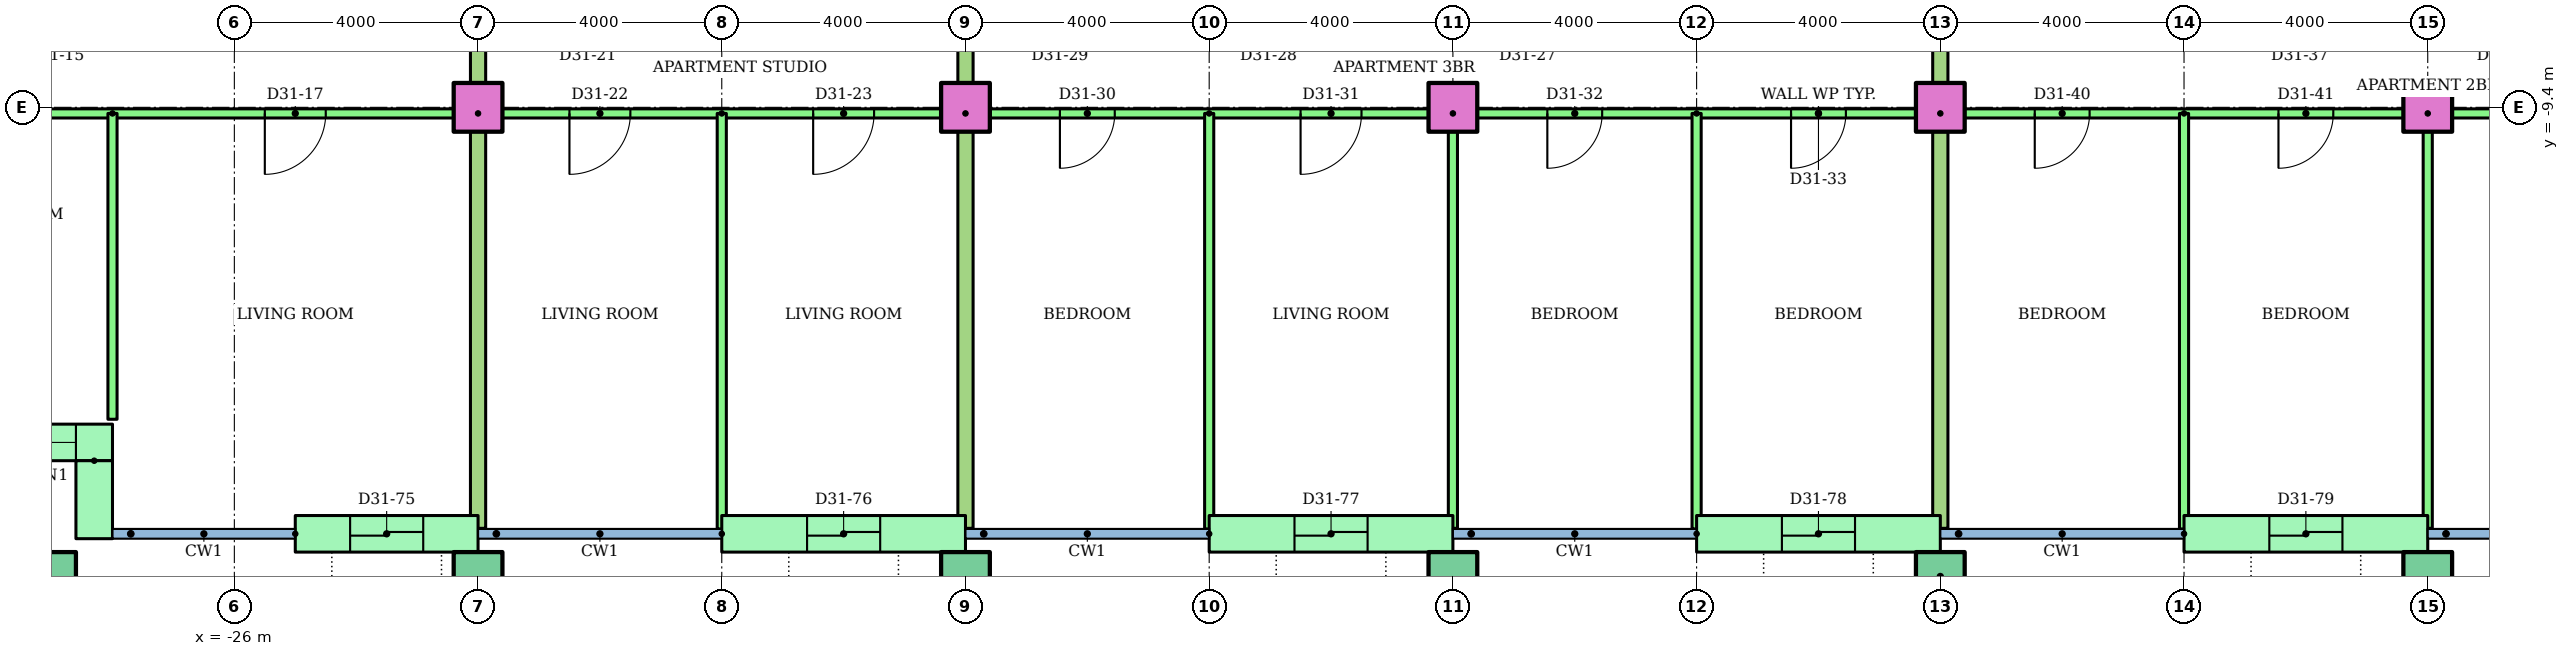
"""IFC4 building model, lengths in metres.
Left out: names, types, materials, properties, quantities, classifications, styles, units other than length and angle.
Written with IfcOpenShell. Run it as: python <this file> out.ifc"""

import sys

from ifc_helpers import new_model, si_unit, direction, frame, frame_2d, origin, origin_2d, place, context, subcontext, project, spatial, rectangle, hollow_rectangle, extrude, element, fill, save


model = new_model("IFC4")
c1 = context("Model", 3, precision=1e-05, world=origin(), true_north=direction((0.0, 1.0)))
c2 = subcontext(c1, "Body", "Model", "MODEL_VIEW")
j1 = project(units=[si_unit("LENGTHUNIT", "METRE"), si_unit("PLANEANGLEUNIT", "RADIAN")], contexts=[c1])
p1 = place(None, origin())
s1 = spatial("IfcSite", under=j1, at=p1, CompositionType="ELEMENT")
p2 = place(p1, origin())
s2 = spatial("IfcBuilding", under=s1, at=p2, CompositionType="ELEMENT")
p3 = place(p2, frame((0.0, 0.0, 123.0)))
s3 = spatial("IfcBuildingStorey", under=s2, at=p3, CompositionType="ELEMENT", Elevation=123.0)
for number, where in (
    (1, (-29.0, -17.1, 0.0)),
    (2, (-22.0, -17.1, 0.0)),
    (3, (-14.0, -17.1, 0.0)),
    (4, (-6.0, -17.1, 0.0)),
    (5, (2.0, -17.1, 0.0)),
    (6, (10.0, -17.1, 0.0)),
):
    element("IfcColumn", number, at=place(p3, frame(where)), inside=s3, PredefinedType="COLUMN", context=c2, shape_type="SweptSolid", body=[
        extrude(hollow_rectangle(XDim=0.8, YDim=0.8, WallThickness=0.04, at=origin_2d()), origin(), (0.0, 0.0, 1.0), 3.2),
    ])
for number, where in (
    (7, (-22.0, -9.4, 0.0)),
    (8, (-14.0, -9.4, 0.0)),
    (9, (-6.0, -9.4, 0.0)),
    (10, (2.0, -9.4, 0.0)),
    (11, (10.0, -9.4, 0.0)),
):
    element("IfcColumn", number, at=place(p3, frame(where)), inside=s3, PredefinedType="COLUMN", context=c2, shape_type="SweptSolid", body=[
        extrude(rectangle(XDim=0.8, YDim=0.8, at=origin_2d()), origin(), (0.0, 0.0, 1.0), 3.2),
    ])
p4 = place(p3, frame((-30.1, -14.9, 0.0)))
e12 = element("IfcWall", 12, at=p4, inside=s3, PredefinedType="STANDARD", context=c2, shape_type="SweptSolid", body=[
    extrude(rectangle(XDim=2.1, YDim=0.6, at=frame_2d((1.05, 0.0))), origin(), (0.0, 0.0, 1.0), 2.92),
])
p5 = place(p4, frame((0.6, 0.0, 0.9)))
e13 = element("IfcOpeningElement", 13, at=p5, cuts=e12, PredefinedType="OPENING", context=c2, shape_type="SweptSolid", body=[
    extrude(rectangle(XDim=0.9, YDim=1.5, at=frame_2d((0.45, 0.75))), frame((0.0, 0.31, 0.0), z_axis=(0.0, -1.0, 0.0), x_axis=(1.0, 0.0, 0.0)), (0.0, 0.0, 1.0), 0.62),
])
p6 = place(p3, frame((-28.3, -15.2, 0.0), z_axis=(0.0, 0.0, 1.0), x_axis=(0.0, -1.0, 0.0)))
e14 = element("IfcWall", 14, at=p6, inside=s3, PredefinedType="STANDARD", context=c2, shape_type="SweptSolid", body=[
    extrude(rectangle(XDim=1.28, YDim=0.6, at=frame_2d((0.64, 0.0))), origin(), (0.0, 0.0, 1.0), 2.92),
])
p7 = place(p3, frame((-25.0, -16.4, 0.0)))
e15 = element("IfcWall", 15, at=p7, inside=s3, PredefinedType="STANDARD", context=c2, shape_type="SweptSolid", body=[
    extrude(rectangle(XDim=3.0, YDim=0.6, at=frame_2d((1.5, 0.0))), origin(), (0.0, 0.0, 1.0), 2.92),
])
p8 = place(p7, frame((0.9, 0.0, 0.0)))
e16 = element("IfcOpeningElement", 16, at=p8, cuts=e15, PredefinedType="OPENING", context=c2, shape_type="SweptSolid", body=[
    extrude(rectangle(XDim=1.2, YDim=2.1, at=frame_2d((0.6, 1.05))), frame((0.0, 0.31, 0.0), z_axis=(0.0, -1.0, 0.0), x_axis=(1.0, 0.0, 0.0)), (0.0, 0.0, 1.0), 0.62),
])
p9 = place(p3, frame((-18.0, -16.4, 0.0)))
e17 = element("IfcWall", 17, at=p9, inside=s3, PredefinedType="STANDARD", context=c2, shape_type="SweptSolid", body=[
    extrude(rectangle(XDim=4.0, YDim=0.6, at=frame_2d((2.0, 0.0))), origin(), (0.0, 0.0, 1.0), 2.92),
])
p10 = place(p9, frame((1.4, 0.0, 0.0)))
e18 = element("IfcOpeningElement", 18, at=p10, cuts=e17, PredefinedType="OPENING", context=c2, shape_type="SweptSolid", body=[
    extrude(rectangle(XDim=1.2, YDim=2.1, at=frame_2d((0.6, 1.05))), frame((0.0, 0.31, 0.0), z_axis=(0.0, -1.0, 0.0), x_axis=(1.0, 0.0, 0.0)), (0.0, 0.0, 1.0), 0.62),
])
p11 = place(p3, frame((-10.0, -16.4, 0.0)))
e19 = element("IfcWall", 19, at=p11, inside=s3, PredefinedType="STANDARD", context=c2, shape_type="SweptSolid", body=[
    extrude(rectangle(XDim=4.0, YDim=0.6, at=frame_2d((2.0, 0.0))), origin(), (0.0, 0.0, 1.0), 2.92),
])
p12 = place(p11, frame((1.4, 0.0, 0.0)))
e20 = element("IfcOpeningElement", 20, at=p12, cuts=e19, PredefinedType="OPENING", context=c2, shape_type="SweptSolid", body=[
    extrude(rectangle(XDim=1.2, YDim=2.1, at=frame_2d((0.6, 1.05))), frame((0.0, 0.31, 0.0), z_axis=(0.0, -1.0, 0.0), x_axis=(1.0, 0.0, 0.0)), (0.0, 0.0, 1.0), 0.62),
])
p13 = place(p3, frame((-2.0, -16.4, 0.0)))
e21 = element("IfcWall", 21, at=p13, inside=s3, PredefinedType="STANDARD", context=c2, shape_type="SweptSolid", body=[
    extrude(rectangle(XDim=4.0, YDim=0.6, at=frame_2d((2.0, 0.0))), origin(), (0.0, 0.0, 1.0), 2.92),
])
p14 = place(p13, frame((1.4, 0.0, 0.0)))
e22 = element("IfcOpeningElement", 22, at=p14, cuts=e21, PredefinedType="OPENING", context=c2, shape_type="SweptSolid", body=[
    extrude(rectangle(XDim=1.2, YDim=2.1, at=frame_2d((0.6, 1.05))), frame((0.0, 0.31, 0.0), z_axis=(0.0, -1.0, 0.0), x_axis=(1.0, 0.0, 0.0)), (0.0, 0.0, 1.0), 0.62),
])
p15 = place(p3, frame((6.0, -16.4, 0.0)))
e23 = element("IfcWall", 23, at=p15, inside=s3, PredefinedType="STANDARD", context=c2, shape_type="SweptSolid", body=[
    extrude(rectangle(XDim=4.0, YDim=0.6, at=frame_2d((2.0, 0.0))), origin(), (0.0, 0.0, 1.0), 2.92),
])
p16 = place(p15, frame((1.4, 0.0, 0.0)))
e24 = element("IfcOpeningElement", 24, at=p16, cuts=e23, PredefinedType="OPENING", context=c2, shape_type="SweptSolid", body=[
    extrude(rectangle(XDim=1.2, YDim=2.1, at=frame_2d((0.6, 1.05))), frame((0.0, 0.31, 0.0), z_axis=(0.0, -1.0, 0.0), x_axis=(1.0, 0.0, 0.0)), (0.0, 0.0, 1.0), 0.62),
])
p17 = place(p3, frame((-22.0, -9.5, 0.0), z_axis=(0.0, 0.0, 1.0), x_axis=(-1.0, 0.0, 0.0)))
e25 = element("IfcWall", 25, at=p17, inside=s3, PredefinedType="PARTITIONING", context=c2, shape_type="SweptSolid", body=[
    extrude(rectangle(XDim=10.72, YDim=0.15, at=frame_2d((5.36, 0.0))), origin(), (0.0, 0.0, 1.0), 2.4),
])
p18 = place(p17, frame((8.618, 0.0, 0.0)))
e26 = element("IfcOpeningElement", 26, at=p18, cuts=e25, PredefinedType="OPENING", context=c2, shape_type="SweptSolid", body=[
    extrude(rectangle(XDim=0.9, YDim=2.1, at=frame_2d((0.45, 1.05))), frame((0.0, 0.085, 0.0), z_axis=(0.0, -1.0, 0.0), x_axis=(1.0, 0.0, 0.0)), (0.0, 0.0, 1.0), 0.17),
])
p19 = place(p17, frame((2.5, 0.0, 0.0)))
e27 = element("IfcOpeningElement", 27, at=p19, cuts=e25, PredefinedType="OPENING", context=c2, shape_type="SweptSolid", body=[
    extrude(rectangle(XDim=1.0, YDim=2.1, at=frame_2d((0.5, 1.05))), frame((0.0, 0.085, 0.0), z_axis=(0.0, -1.0, 0.0), x_axis=(1.0, 0.0, 0.0)), (0.0, 0.0, 1.0), 0.17),
])
p20 = place(p3, frame((-28.0, -9.5, 0.0), z_axis=(0.0, 0.0, 1.0), x_axis=(0.0, -1.0, 0.0)))
e28 = element("IfcWall", 28, at=p20, inside=s3, PredefinedType="PARTITIONING", context=c2, shape_type="SweptSolid", body=[
    extrude(rectangle(XDim=5.02, YDim=0.15, at=frame_2d((2.51, 0.0))), origin(), (0.0, 0.0, 1.0), 2.4),
])
p21 = place(p3, frame((-14.0, -9.5, 0.0), z_axis=(0.0, 0.0, 1.0), x_axis=(-1.0, 0.0, 0.0)))
e29 = element("IfcWall", 29, at=p21, inside=s3, PredefinedType="PARTITIONING", context=c2, shape_type="SweptSolid", body=[
    extrude(rectangle(XDim=8.0, YDim=0.15, at=frame_2d((4.0, 0.0))), origin(), (0.0, 0.0, 1.0), 2.4),
])
p22 = place(p21, frame((5.5, 0.0, 0.0)))
e30 = element("IfcOpeningElement", 30, at=p22, cuts=e29, PredefinedType="OPENING", context=c2, shape_type="SweptSolid", body=[
    extrude(rectangle(XDim=1.0, YDim=2.1, at=frame_2d((0.5, 1.05))), frame((0.0, 0.085, 0.0), z_axis=(0.0, -1.0, 0.0), x_axis=(1.0, 0.0, 0.0)), (0.0, 0.0, 1.0), 0.17),
])
p23 = place(p21, frame((1.5, 0.0, 0.0)))
e31 = element("IfcOpeningElement", 31, at=p23, cuts=e29, PredefinedType="OPENING", context=c2, shape_type="SweptSolid", body=[
    extrude(rectangle(XDim=1.0, YDim=2.1, at=frame_2d((0.5, 1.05))), frame((0.0, 0.085, 0.0), z_axis=(0.0, -1.0, 0.0), x_axis=(1.0, 0.0, 0.0)), (0.0, 0.0, 1.0), 0.17),
])
p24 = place(p3, frame((-18.0, -9.5, 0.0), z_axis=(0.0, 0.0, 1.0), x_axis=(0.0, -1.0, 0.0)))
e32 = element("IfcWall", 32, at=p24, inside=s3, PredefinedType="PARTITIONING", context=c2, shape_type="SweptSolid", body=[
    extrude(rectangle(XDim=6.821, YDim=0.15, at=frame_2d((3.411, 0.0))), origin(), (0.0, 0.0, 1.0), 2.4),
])
p25 = place(p3, frame((-22.0, -1.4, 0.0), z_axis=(0.0, 0.0, 1.0), x_axis=(0.0, -1.0, 0.0)))
e33 = element("IfcWall", 33, at=p25, inside=s3, PredefinedType="PARTITIONING", context=c2, shape_type="SweptSolid", body=[
    extrude(rectangle(XDim=14.91, YDim=0.25, at=frame_2d((7.455, 0.0))), origin(), (0.0, 0.0, 1.0), 2.4),
])
p26 = place(p3, frame((2.0, -9.5, 0.0), z_axis=(0.0, 0.0, 1.0), x_axis=(-1.0, 0.0, 0.0)))
e34 = element("IfcWall", 34, at=p26, inside=s3, PredefinedType="PARTITIONING", context=c2, shape_type="SweptSolid", body=[
    extrude(rectangle(XDim=16.0, YDim=0.15, at=frame_2d((8.0, 0.0))), origin(), (0.0, 0.0, 1.0), 2.4),
])
p27 = place(p26, frame((13.55, 0.0, 0.0)))
e35 = element("IfcOpeningElement", 35, at=p27, cuts=e34, PredefinedType="OPENING", context=c2, shape_type="SweptSolid", body=[
    extrude(rectangle(XDim=0.9, YDim=2.1, at=frame_2d((0.45, 1.05))), frame((0.0, 0.085, 0.0), z_axis=(0.0, -1.0, 0.0), x_axis=(1.0, 0.0, 0.0)), (0.0, 0.0, 1.0), 0.17),
])
p28 = place(p26, frame((9.5, 0.0, 0.0)))
e36 = element("IfcOpeningElement", 36, at=p28, cuts=e34, PredefinedType="OPENING", context=c2, shape_type="SweptSolid", body=[
    extrude(rectangle(XDim=1.0, YDim=2.1, at=frame_2d((0.5, 1.05))), frame((0.0, 0.085, 0.0), z_axis=(0.0, -1.0, 0.0), x_axis=(1.0, 0.0, 0.0)), (0.0, 0.0, 1.0), 0.17),
])
p29 = place(p26, frame((5.55, 0.0, 0.0)))
e37 = element("IfcOpeningElement", 37, at=p29, cuts=e34, PredefinedType="OPENING", context=c2, shape_type="SweptSolid", body=[
    extrude(rectangle(XDim=0.9, YDim=2.1, at=frame_2d((0.45, 1.05))), frame((0.0, 0.085, 0.0), z_axis=(0.0, -1.0, 0.0), x_axis=(1.0, 0.0, 0.0)), (0.0, 0.0, 1.0), 0.17),
])
p30 = place(p26, frame((1.55, 0.0, 0.0)))
e38 = element("IfcOpeningElement", 38, at=p30, cuts=e34, PredefinedType="OPENING", context=c2, shape_type="SweptSolid", body=[
    extrude(rectangle(XDim=0.9, YDim=2.1, at=frame_2d((0.45, 1.05))), frame((0.0, 0.085, 0.0), z_axis=(0.0, -1.0, 0.0), x_axis=(1.0, 0.0, 0.0)), (0.0, 0.0, 1.0), 0.17),
])
p31 = place(p3, frame((-10.0, -9.5, 0.0), z_axis=(0.0, 0.0, 1.0), x_axis=(0.0, -1.0, 0.0)))
e39 = element("IfcWall", 39, at=p31, inside=s3, PredefinedType="PARTITIONING", context=c2, shape_type="SweptSolid", body=[
    extrude(rectangle(XDim=6.821, YDim=0.15, at=frame_2d((3.411, 0.0))), origin(), (0.0, 0.0, 1.0), 2.4),
])
p32 = place(p3, frame((-6.0, -9.5, 0.0), z_axis=(0.0, 0.0, 1.0), x_axis=(0.0, -1.0, 0.0)))
e40 = element("IfcWall", 40, at=p32, inside=s3, PredefinedType="PARTITIONING", context=c2, shape_type="SweptSolid", body=[
    extrude(rectangle(XDim=6.81, YDim=0.15, at=frame_2d((3.405, 0.0))), origin(), (0.0, 0.0, 1.0), 2.4),
])
p33 = place(p3, frame((-2.0, -9.5, 0.0), z_axis=(0.0, 0.0, 1.0), x_axis=(0.0, -1.0, 0.0)))
e41 = element("IfcWall", 41, at=p33, inside=s3, PredefinedType="PARTITIONING", context=c2, shape_type="SweptSolid", body=[
    extrude(rectangle(XDim=6.821, YDim=0.15, at=frame_2d((3.411, 0.0))), origin(), (0.0, 0.0, 1.0), 2.4),
])
p34 = place(p3, frame((-14.0, -1.4, 0.0), z_axis=(0.0, 0.0, 1.0), x_axis=(0.0, -1.0, 0.0)))
e42 = element("IfcWall", 42, at=p34, inside=s3, PredefinedType="PARTITIONING", context=c2, shape_type="SweptSolid", body=[
    extrude(rectangle(XDim=14.91, YDim=0.25, at=frame_2d((7.455, 0.0))), origin(), (0.0, 0.0, 1.0), 2.4),
])
p35 = place(p3, frame((18.0, -9.5, 0.0), z_axis=(0.0, 0.0, 1.0), x_axis=(-1.0, 0.0, 0.0)))
e43 = element("IfcWall", 43, at=p35, inside=s3, PredefinedType="PARTITIONING", context=c2, shape_type="SweptSolid", body=[
    extrude(rectangle(XDim=16.0, YDim=0.15, at=frame_2d((8.0, 0.0))), origin(), (0.0, 0.0, 1.0), 2.4),
])
p36 = place(p35, frame((13.55, 0.0, 0.0)))
e44 = element("IfcOpeningElement", 44, at=p36, cuts=e43, PredefinedType="OPENING", context=c2, shape_type="SweptSolid", body=[
    extrude(rectangle(XDim=0.9, YDim=2.1, at=frame_2d((0.45, 1.05))), frame((0.0, 0.085, 0.0), z_axis=(0.0, -1.0, 0.0), x_axis=(1.0, 0.0, 0.0)), (0.0, 0.0, 1.0), 0.17),
])
p37 = place(p35, frame((9.55, 0.0, 0.0)))
e45 = element("IfcOpeningElement", 45, at=p37, cuts=e43, PredefinedType="OPENING", context=c2, shape_type="SweptSolid", body=[
    extrude(rectangle(XDim=0.9, YDim=2.1, at=frame_2d((0.45, 1.05))), frame((0.0, 0.085, 0.0), z_axis=(0.0, -1.0, 0.0), x_axis=(1.0, 0.0, 0.0)), (0.0, 0.0, 1.0), 0.17),
])
p38 = place(p35, frame((3.5, 0.0, 0.0)))
e46 = element("IfcOpeningElement", 46, at=p38, cuts=e43, PredefinedType="OPENING", context=c2, shape_type="SweptSolid", body=[
    extrude(rectangle(XDim=1.0, YDim=2.1, at=frame_2d((0.5, 1.05))), frame((0.0, 0.085, 0.0), z_axis=(0.0, -1.0, 0.0), x_axis=(1.0, 0.0, 0.0)), (0.0, 0.0, 1.0), 0.17),
])
p39 = place(p3, frame((6.0, -9.5, 0.0), z_axis=(0.0, 0.0, 1.0), x_axis=(0.0, -1.0, 0.0)))
e47 = element("IfcWall", 47, at=p39, inside=s3, PredefinedType="PARTITIONING", context=c2, shape_type="SweptSolid", body=[
    extrude(rectangle(XDim=6.821, YDim=0.15, at=frame_2d((3.411, 0.0))), origin(), (0.0, 0.0, 1.0), 2.4),
])
p40 = place(p3, frame((10.0, -9.5, 0.0), z_axis=(0.0, 0.0, 1.0), x_axis=(0.0, -1.0, 0.0)))
e48 = element("IfcWall", 48, at=p40, inside=s3, PredefinedType="PARTITIONING", context=c2, shape_type="SweptSolid", body=[
    extrude(rectangle(XDim=6.81, YDim=0.15, at=frame_2d((3.405, 0.0))), origin(), (0.0, 0.0, 1.0), 2.4),
])
p41 = place(p3, frame((2.0, -1.4, 0.0), z_axis=(0.0, 0.0, 1.0), x_axis=(0.0, -1.0, 0.0)))
e49 = element("IfcWall", 49, at=p41, inside=s3, PredefinedType="PARTITIONING", context=c2, shape_type="SweptSolid", body=[
    extrude(rectangle(XDim=14.91, YDim=0.25, at=frame_2d((7.455, 0.0))), origin(), (0.0, 0.0, 1.0), 2.4),
])
p42 = place(p5, origin())
e50 = element("IfcWindow", 50, at=p42, inside=s3, PartitioningType="SINGLE_PANEL", PredefinedType="WINDOW", context=c2, shape_type="SweptSolid", body=[
    extrude(rectangle(XDim=0.9, YDim=1.5, at=frame_2d((0.45, 0.75))), frame((0.0, 0.03, 0.0), z_axis=(0.0, -1.0, 0.0), x_axis=(1.0, 0.0, 0.0)), (0.0, 0.0, 1.0), 0.06),
])
fill(e13, e50)
p43 = place(p19, origin())
e51 = element("IfcDoor", 51, at=p43, inside=s3, OperationType="SINGLE_SWING_RIGHT", PredefinedType="DOOR", context=c2, shape_type="SweptSolid", body=[
    extrude(rectangle(XDim=1.0, YDim=2.1, at=frame_2d((0.5, 1.05))), frame((0.0, 0.025, 0.0), z_axis=(0.0, -1.0, 0.0), x_axis=(1.0, 0.0, 0.0)), (0.0, 0.0, 1.0), 0.05),
])
fill(e27, e51)
p44 = place(p22, origin())
e52 = element("IfcDoor", 52, at=p44, inside=s3, OperationType="SINGLE_SWING_RIGHT", PredefinedType="DOOR", context=c2, shape_type="SweptSolid", body=[
    extrude(rectangle(XDim=1.0, YDim=2.1, at=frame_2d((0.5, 1.05))), frame((0.0, 0.025, 0.0), z_axis=(0.0, -1.0, 0.0), x_axis=(1.0, 0.0, 0.0)), (0.0, 0.0, 1.0), 0.05),
])
fill(e30, e52)
p45 = place(p23, origin())
e53 = element("IfcDoor", 53, at=p45, inside=s3, OperationType="SINGLE_SWING_RIGHT", PredefinedType="DOOR", context=c2, shape_type="SweptSolid", body=[
    extrude(rectangle(XDim=1.0, YDim=2.1, at=frame_2d((0.5, 1.05))), frame((0.0, 0.025, 0.0), z_axis=(0.0, -1.0, 0.0), x_axis=(1.0, 0.0, 0.0)), (0.0, 0.0, 1.0), 0.05),
])
fill(e31, e53)
p46 = place(p27, origin())
e54 = element("IfcDoor", 54, at=p46, inside=s3, OperationType="SINGLE_SWING_RIGHT", PredefinedType="DOOR", context=c2, shape_type="SweptSolid", body=[
    extrude(rectangle(XDim=0.9, YDim=2.1, at=frame_2d((0.45, 1.05))), frame((0.0, 0.025, 0.0), z_axis=(0.0, -1.0, 0.0), x_axis=(1.0, 0.0, 0.0)), (0.0, 0.0, 1.0), 0.05),
])
fill(e35, e54)
p47 = place(p28, origin())
e55 = element("IfcDoor", 55, at=p47, inside=s3, OperationType="SINGLE_SWING_RIGHT", PredefinedType="DOOR", context=c2, shape_type="SweptSolid", body=[
    extrude(rectangle(XDim=1.0, YDim=2.1, at=frame_2d((0.5, 1.05))), frame((0.0, 0.025, 0.0), z_axis=(0.0, -1.0, 0.0), x_axis=(1.0, 0.0, 0.0)), (0.0, 0.0, 1.0), 0.05),
])
fill(e36, e55)
p48 = place(p29, origin())
e56 = element("IfcDoor", 56, at=p48, inside=s3, OperationType="SINGLE_SWING_RIGHT", PredefinedType="DOOR", context=c2, shape_type="SweptSolid", body=[
    extrude(rectangle(XDim=0.9, YDim=2.1, at=frame_2d((0.45, 1.05))), frame((0.0, 0.025, 0.0), z_axis=(0.0, -1.0, 0.0), x_axis=(1.0, 0.0, 0.0)), (0.0, 0.0, 1.0), 0.05),
])
fill(e37, e56)
p49 = place(p30, origin())
e57 = element("IfcDoor", 57, at=p49, inside=s3, OperationType="SINGLE_SWING_RIGHT", PredefinedType="DOOR", context=c2, shape_type="SweptSolid", body=[
    extrude(rectangle(XDim=0.9, YDim=2.1, at=frame_2d((0.45, 1.05))), frame((0.0, 0.025, 0.0), z_axis=(0.0, -1.0, 0.0), x_axis=(1.0, 0.0, 0.0)), (0.0, 0.0, 1.0), 0.05),
])
fill(e38, e57)
p50 = place(p36, origin())
e58 = element("IfcDoor", 58, at=p50, inside=s3, OperationType="SINGLE_SWING_RIGHT", PredefinedType="DOOR", context=c2, shape_type="SweptSolid", body=[
    extrude(rectangle(XDim=0.9, YDim=2.1, at=frame_2d((0.45, 1.05))), frame((0.0, 0.025, 0.0), z_axis=(0.0, -1.0, 0.0), x_axis=(1.0, 0.0, 0.0)), (0.0, 0.0, 1.0), 0.05),
])
fill(e44, e58)
p51 = place(p37, origin())
e59 = element("IfcDoor", 59, at=p51, inside=s3, OperationType="SINGLE_SWING_RIGHT", PredefinedType="DOOR", context=c2, shape_type="SweptSolid", body=[
    extrude(rectangle(XDim=0.9, YDim=2.1, at=frame_2d((0.45, 1.05))), frame((0.0, 0.025, 0.0), z_axis=(0.0, -1.0, 0.0), x_axis=(1.0, 0.0, 0.0)), (0.0, 0.0, 1.0), 0.05),
])
fill(e45, e59)
p52 = place(p8, origin())
e60 = element("IfcDoor", 60, at=p52, inside=s3, OperationType="SLIDING_TO_LEFT", PredefinedType="DOOR", context=c2, shape_type="SweptSolid", body=[
    extrude(rectangle(XDim=1.2, YDim=2.1, at=frame_2d((0.6, 1.05))), frame((0.0, 0.025, 0.0), z_axis=(0.0, -1.0, 0.0), x_axis=(1.0, 0.0, 0.0)), (0.0, 0.0, 1.0), 0.05),
])
fill(e16, e60)
p53 = place(p10, origin())
e61 = element("IfcDoor", 61, at=p53, inside=s3, OperationType="SLIDING_TO_LEFT", PredefinedType="DOOR", context=c2, shape_type="SweptSolid", body=[
    extrude(rectangle(XDim=1.2, YDim=2.1, at=frame_2d((0.6, 1.05))), frame((0.0, 0.025, 0.0), z_axis=(0.0, -1.0, 0.0), x_axis=(1.0, 0.0, 0.0)), (0.0, 0.0, 1.0), 0.05),
])
fill(e18, e61)
p54 = place(p12, origin())
e62 = element("IfcDoor", 62, at=p54, inside=s3, OperationType="SLIDING_TO_LEFT", PredefinedType="DOOR", context=c2, shape_type="SweptSolid", body=[
    extrude(rectangle(XDim=1.2, YDim=2.1, at=frame_2d((0.6, 1.05))), frame((0.0, 0.025, 0.0), z_axis=(0.0, -1.0, 0.0), x_axis=(1.0, 0.0, 0.0)), (0.0, 0.0, 1.0), 0.05),
])
fill(e20, e62)
p55 = place(p14, origin())
e63 = element("IfcDoor", 63, at=p55, inside=s3, OperationType="SLIDING_TO_LEFT", PredefinedType="DOOR", context=c2, shape_type="SweptSolid", body=[
    extrude(rectangle(XDim=1.2, YDim=2.1, at=frame_2d((0.6, 1.05))), frame((0.0, 0.025, 0.0), z_axis=(0.0, -1.0, 0.0), x_axis=(1.0, 0.0, 0.0)), (0.0, 0.0, 1.0), 0.05),
])
fill(e22, e63)
p56 = place(p16, origin())
e64 = element("IfcDoor", 64, at=p56, inside=s3, OperationType="SLIDING_TO_LEFT", PredefinedType="DOOR", context=c2, shape_type="SweptSolid", body=[
    extrude(rectangle(XDim=1.2, YDim=2.1, at=frame_2d((0.6, 1.05))), frame((0.0, 0.025, 0.0), z_axis=(0.0, -1.0, 0.0), x_axis=(1.0, 0.0, 0.0)), (0.0, 0.0, 1.0), 0.05),
])
fill(e24, e64)
save(model, sys.argv[1])
